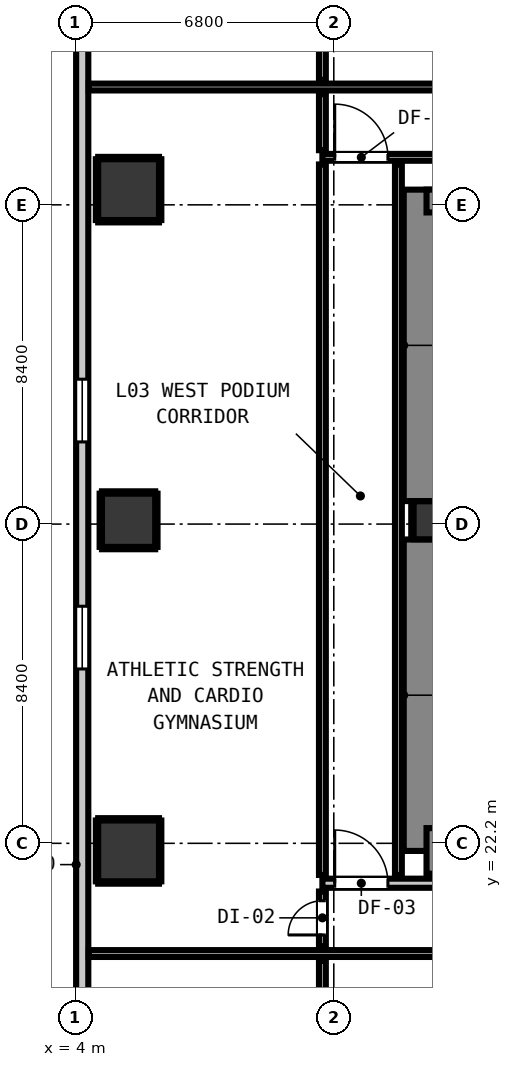
"""IFC4 building model, lengths in metres.
Left out: names, types, materials, properties, quantities, classifications, styles, units other than length and angle.
Written with IfcOpenShell. Run it as: python <this file> out.ifc"""

import sys

from ifc_helpers import new_model, si_unit, direction, frame, frame_2d, origin, origin_2d, place, context, subcontext, project, spatial, rectangle, extrude, element, fill, save


model = new_model("IFC4")
c1 = context("Model", 3, precision=1e-05, world=origin(), true_north=direction((0.0, 1.0)))
c2 = subcontext(c1, "Body", "Model", "MODEL_VIEW")
j1 = project(units=[si_unit("LENGTHUNIT", "METRE"), si_unit("PLANEANGLEUNIT", "RADIAN")], contexts=[c1])
p1 = place(None, origin())
s1 = spatial("IfcSite", under=j1, at=p1, CompositionType="ELEMENT")
p2 = place(p1, origin())
s2 = spatial("IfcBuilding", under=s1, at=p2, CompositionType="ELEMENT")
p3 = place(p2, frame((0.0, 0.0, 13.6)))
s3 = spatial("IfcBuildingStorey", under=s2, at=p3, CompositionType="ELEMENT", Elevation=13.6)
p4 = place(p3, frame((13.4, 30.7, 0.0), z_axis=(0.0, 0.0, 1.0), x_axis=(1.0, 0.0, 0.0)))
e1 = element("IfcColumn", 1, at=p4, inside=s3, PredefinedType="COLUMN", context=c2, shape_type="SweptSolid", body=[
    extrude(rectangle(XDim=1.0, YDim=1.0, at=origin_2d()), origin(), (0.0, 0.0, 1.0), 4.2),
])
p5 = place(p3, frame((13.24, 22.0, 0.0), z_axis=(0.0, 0.0, 1.0), x_axis=(0.0, 1.0, 0.0)))
e2 = element("IfcWall", 2, at=p5, inside=s3, PredefinedType="SHEAR", context=c2, shape_type="SweptSolid", body=[
    extrude(rectangle(XDim=8.195, YDim=1.2, at=frame_2d((4.098, 0.0))), origin(), (0.0, 0.0, 1.0), 4.2),
])
p6 = place(p3, frame((13.24, 31.205, 0.0), z_axis=(0.0, 0.0, 1.0), x_axis=(0.0, 1.0, 0.0)))
e3 = element("IfcWall", 3, at=p6, inside=s3, PredefinedType="SHEAR", context=c2, shape_type="SweptSolid", body=[
    extrude(rectangle(XDim=8.195, YDim=1.2, at=frame_2d((4.097, 0.0))), origin(), (0.0, 0.0, 1.0), 4.2),
])
p7 = place(p3, frame((13.24, 22.0, 0.0), z_axis=(0.0, 0.0, 1.0), x_axis=(1.0, 0.0, 0.0)))
e4 = element("IfcWall", 4, at=p7, inside=s3, PredefinedType="SHEAR", context=c2, shape_type="SweptSolid", body=[
    extrude(rectangle(XDim=4.08, YDim=1.2, at=frame_2d((2.04, 0.0))), origin(), (0.0, 0.0, 1.0), 4.2),
])
p8 = place(p3, frame((13.24, 39.1, 0.0), z_axis=(0.0, 0.0, 1.0), x_axis=(1.0, 0.0, 0.0)))
e5 = element("IfcWall", 5, at=p8, inside=s3, PredefinedType="SHEAR", context=c2, shape_type="SweptSolid", body=[
    extrude(rectangle(XDim=4.08, YDim=0.6, at=frame_2d((2.04, 0.0))), origin(), (0.0, 0.0, 1.0), 4.2),
])
p9 = place(p3, frame((5.4, 22.0, 0.0), z_axis=(0.0, 0.0, 1.0), x_axis=(1.0, 0.0, 0.0)))
e6 = element("IfcColumn", 6, at=p9, inside=s3, PredefinedType="COLUMN", context=c2, shape_type="SweptSolid", body=[
    extrude(rectangle(XDim=1.6, YDim=1.6, at=origin_2d()), origin(), (0.0, 0.0, 1.0), 4.2),
])
p10 = place(p3, frame((5.4, 30.7, 0.0), z_axis=(0.0, 0.0, 1.0), x_axis=(1.0, 0.0, 0.0)))
e7 = element("IfcColumn", 7, at=p10, inside=s3, PredefinedType="COLUMN", context=c2, shape_type="SweptSolid", body=[
    extrude(rectangle(XDim=1.4, YDim=1.4, at=origin_2d()), origin(), (0.0, 0.0, 1.0), 4.2),
])
p11 = place(p3, frame((5.4, 39.4, 0.0), z_axis=(0.0, 0.0, 1.0), x_axis=(1.0, 0.0, 0.0)))
e8 = element("IfcColumn", 8, at=p11, inside=s3, PredefinedType="COLUMN", context=c2, shape_type="SweptSolid", body=[
    extrude(rectangle(XDim=1.6, YDim=1.6, at=origin_2d()), origin(), (0.0, 0.0, 1.0), 4.2),
])
p12 = place(p3, frame((4.18, 12.68, 0.0), z_axis=(0.0, 0.0, 1.0), x_axis=(0.0, 1.0, 0.0)))
e9 = element("IfcWall", 9, at=p12, inside=s3, PredefinedType="STANDARD", context=c2, shape_type="SweptSolid", body=[
    extrude(rectangle(XDim=35.84, YDim=0.32, at=frame_2d((17.92, 0.0))), origin(), (0.0, 0.0, 1.0), 3.78),
])
p13 = place(p12, frame((2.162, 0.0, 0.9)))
e10 = element("IfcOpeningElement", 10, at=p13, cuts=e9, PredefinedType="OPENING", context=c2, shape_type="SweptSolid", body=[
    extrude(rectangle(XDim=1.65, YDim=1.75, at=frame_2d((0.825, 0.875))), frame((0.0, 0.17, 0.0), z_axis=(0.0, -1.0, 0.0), x_axis=(1.0, 0.0, 0.0)), (0.0, 0.0, 1.0), 0.34),
])
p14 = place(p12, frame((14.108, 0.0, 0.9)))
e11 = element("IfcOpeningElement", 11, at=p14, cuts=e9, PredefinedType="OPENING", context=c2, shape_type="SweptSolid", body=[
    extrude(rectangle(XDim=1.65, YDim=1.75, at=frame_2d((0.825, 0.875))), frame((0.0, 0.17, 0.0), z_axis=(0.0, -1.0, 0.0), x_axis=(1.0, 0.0, 0.0)), (0.0, 0.0, 1.0), 0.34),
])
p15 = place(p12, frame((20.082, 0.0, 0.9)))
e12 = element("IfcOpeningElement", 12, at=p15, cuts=e9, PredefinedType="OPENING", context=c2, shape_type="SweptSolid", body=[
    extrude(rectangle(XDim=1.65, YDim=1.75, at=frame_2d((0.825, 0.875))), frame((0.0, 0.17, 0.0), z_axis=(0.0, -1.0, 0.0), x_axis=(1.0, 0.0, 0.0)), (0.0, 0.0, 1.0), 0.34),
])
p16 = place(p12, frame((32.028, 0.0, 0.9)))
e13 = element("IfcOpeningElement", 13, at=p16, cuts=e9, PredefinedType="OPENING", context=c2, shape_type="SweptSolid", body=[
    extrude(rectangle(XDim=1.65, YDim=1.75, at=frame_2d((0.825, 0.875))), frame((0.0, 0.17, 0.0), z_axis=(0.0, -1.0, 0.0), x_axis=(1.0, 0.0, 0.0)), (0.0, 0.0, 1.0), 0.34),
])
p17 = place(p3, frame((10.5, 21.15, 0.0), z_axis=(0.0, 0.0, 1.0), x_axis=(1.0, 0.0, 0.0)))
e14 = element("IfcWall", 14, at=p17, inside=s3, PredefinedType="PARTITIONING", context=c2, shape_type="SweptSolid", body=[
    extrude(rectangle(XDim=28.7, YDim=0.24, at=frame_2d((14.35, 0.0))), origin(), (0.0, 0.0, 1.0), 3.78),
])
p18 = place(p17, frame((7.71, 0.0, 0.0)))
e15 = element("IfcOpeningElement", 15, at=p18, cuts=e14, PredefinedType="OPENING", context=c2, shape_type="SweptSolid", body=[
    extrude(rectangle(XDim=1.1, YDim=2.15, at=frame_2d((0.55, 1.075))), frame((0.0, 0.13, 0.0), z_axis=(0.0, -1.0, 0.0), x_axis=(1.0, 0.0, 0.0)), (0.0, 0.0, 1.0), 0.26),
])
p19 = place(p17, frame((0.324, 0.0, 0.0)))
e16 = element("IfcOpeningElement", 16, at=p19, cuts=e14, PredefinedType="OPENING", context=c2, shape_type="SweptSolid", body=[
    extrude(rectangle(XDim=1.4, YDim=2.15, at=frame_2d((0.7, 1.075))), frame((0.0, 0.13, 0.0), z_axis=(0.0, -1.0, 0.0), x_axis=(1.0, 0.0, 0.0)), (0.0, 0.0, 1.0), 0.26),
])
p20 = place(p17, frame((27.026, 0.0, 0.0)))
e17 = element("IfcOpeningElement", 17, at=p20, cuts=e14, PredefinedType="OPENING", context=c2, shape_type="SweptSolid", body=[
    extrude(rectangle(XDim=1.4, YDim=2.15, at=frame_2d((0.7, 1.075))), frame((0.0, 0.13, 0.0), z_axis=(0.0, -1.0, 0.0), x_axis=(1.0, 0.0, 0.0)), (0.0, 0.0, 1.0), 0.26),
])
p21 = place(p3, frame((4.352, 19.3, 0.0), z_axis=(0.0, 0.0, 1.0), x_axis=(1.0, 0.0, 0.0)))
e18 = element("IfcWall", 18, at=p21, inside=s3, PredefinedType="PARTITIONING", context=c2, shape_type="SweptSolid", body=[
    extrude(rectangle(XDim=43.296, YDim=0.18, at=frame_2d((21.648, 0.0))), origin(), (0.0, 0.0, 1.0), 3.78),
])
p22 = place(p21, frame((12.872, 0.0, 0.0)))
e19 = element("IfcOpeningElement", 19, at=p22, cuts=e18, PredefinedType="OPENING", context=c2, shape_type="SweptSolid", body=[
    extrude(rectangle(XDim=0.9, YDim=2.1, at=frame_2d((0.45, 1.05))), frame((0.0, 0.1, 0.0), z_axis=(0.0, -1.0, 0.0), x_axis=(1.0, 0.0, 0.0)), (0.0, 0.0, 1.0), 0.2),
])
p23 = place(p21, frame((27.174, 0.0, 0.0)))
e20 = element("IfcOpeningElement", 20, at=p23, cuts=e18, PredefinedType="OPENING", context=c2, shape_type="SweptSolid", body=[
    extrude(rectangle(XDim=0.9, YDim=2.1, at=frame_2d((0.45, 1.05))), frame((0.0, 0.1, 0.0), z_axis=(0.0, -1.0, 0.0), x_axis=(1.0, 0.0, 0.0)), (0.0, 0.0, 1.0), 0.2),
])
p24 = place(p3, frame((10.5, 40.25, 0.0), z_axis=(0.0, 0.0, 1.0), x_axis=(1.0, 0.0, 0.0)))
e21 = element("IfcWall", 21, at=p24, inside=s3, PredefinedType="PARTITIONING", context=c2, shape_type="SweptSolid", body=[
    extrude(rectangle(XDim=37.2, YDim=0.18, at=frame_2d((18.6, 0.0))), origin(), (0.0, 0.0, 1.0), 3.78),
])
p25 = place(p24, frame((6.935, 0.0, 0.0)))
e22 = element("IfcOpeningElement", 22, at=p25, cuts=e21, PredefinedType="OPENING", context=c2, shape_type="SweptSolid", body=[
    extrude(rectangle(XDim=1.4, YDim=2.15, at=frame_2d((0.7, 1.075))), frame((0.0, 0.1, 0.0), z_axis=(0.0, -1.0, 0.0), x_axis=(1.0, 0.0, 0.0)), (0.0, 0.0, 1.0), 0.2),
])
p26 = place(p24, frame((0.324, 0.0, 0.0)))
e23 = element("IfcOpeningElement", 23, at=p26, cuts=e21, PredefinedType="OPENING", context=c2, shape_type="SweptSolid", body=[
    extrude(rectangle(XDim=1.4, YDim=2.15, at=frame_2d((0.7, 1.075))), frame((0.0, 0.1, 0.0), z_axis=(0.0, -1.0, 0.0), x_axis=(1.0, 0.0, 0.0)), (0.0, 0.0, 1.0), 0.2),
])
p27 = place(p24, frame((27.05, 0.0, 0.0)))
e24 = element("IfcOpeningElement", 24, at=p27, cuts=e21, PredefinedType="OPENING", context=c2, shape_type="SweptSolid", body=[
    extrude(rectangle(XDim=1.4, YDim=2.15, at=frame_2d((0.7, 1.075))), frame((0.0, 0.1, 0.0), z_axis=(0.0, -1.0, 0.0), x_axis=(1.0, 0.0, 0.0)), (0.0, 0.0, 1.0), 0.2),
])
p28 = place(p3, frame((4.352, 42.1, 0.0), z_axis=(0.0, 0.0, 1.0), x_axis=(1.0, 0.0, 0.0)))
e25 = element("IfcWall", 25, at=p28, inside=s3, PredefinedType="PARTITIONING", context=c2, shape_type="SweptSolid", body=[
    extrude(rectangle(XDim=43.296, YDim=0.18, at=frame_2d((21.648, 0.0))), origin(), (0.0, 0.0, 1.0), 3.78),
])
p29 = place(p28, frame((14.472, 0.0, 0.0)))
e26 = element("IfcOpeningElement", 26, at=p29, cuts=e25, PredefinedType="OPENING", context=c2, shape_type="SweptSolid", body=[
    extrude(rectangle(XDim=0.9, YDim=2.1, at=frame_2d((0.45, 1.05))), frame((0.0, 0.1, 0.0), z_axis=(0.0, -1.0, 0.0), x_axis=(1.0, 0.0, 0.0)), (0.0, 0.0, 1.0), 0.2),
])
p30 = place(p28, frame((25.118, 0.0, 0.0)))
e27 = element("IfcOpeningElement", 27, at=p30, cuts=e25, PredefinedType="OPENING", context=c2, shape_type="SweptSolid", body=[
    extrude(rectangle(XDim=0.86, YDim=2.02, at=frame_2d((0.43, 1.01))), frame((0.0, 0.1, 0.0), z_axis=(0.0, -1.0, 0.0), x_axis=(1.0, 0.0, 0.0)), (0.0, 0.0, 1.0), 0.2),
])
p31 = place(p28, frame((29.218, 0.0, 0.0)))
e28 = element("IfcOpeningElement", 28, at=p31, cuts=e25, PredefinedType="OPENING", context=c2, shape_type="SweptSolid", body=[
    extrude(rectangle(XDim=0.86, YDim=2.02, at=frame_2d((0.43, 1.01))), frame((0.0, 0.1, 0.0), z_axis=(0.0, -1.0, 0.0), x_axis=(1.0, 0.0, 0.0)), (0.0, 0.0, 1.0), 0.2),
])
p32 = place(p28, frame((32.873, 0.0, 0.0)))
e29 = element("IfcOpeningElement", 29, at=p32, cuts=e25, PredefinedType="OPENING", context=c2, shape_type="SweptSolid", body=[
    extrude(rectangle(XDim=0.95, YDim=2.1, at=frame_2d((0.475, 1.05))), frame((0.0, 0.1, 0.0), z_axis=(0.0, -1.0, 0.0), x_axis=(1.0, 0.0, 0.0)), (0.0, 0.0, 1.0), 0.2),
])
p33 = place(p28, frame((35.688, 0.0, 0.0)))
e30 = element("IfcOpeningElement", 30, at=p33, cuts=e25, PredefinedType="OPENING", context=c2, shape_type="SweptSolid", body=[
    extrude(rectangle(XDim=0.9, YDim=2.1, at=frame_2d((0.45, 1.05))), frame((0.0, 0.1, 0.0), z_axis=(0.0, -1.0, 0.0), x_axis=(1.0, 0.0, 0.0)), (0.0, 0.0, 1.0), 0.2),
])
p34 = place(p3, frame((10.5, 12.358, 0.0), z_axis=(0.0, 0.0, 1.0), x_axis=(0.0, 1.0, 0.0)))
e31 = element("IfcWall", 31, at=p34, inside=s3, PredefinedType="PARTITIONING", context=c2, shape_type="SweptSolid", body=[
    extrude(rectangle(XDim=6.754, YDim=0.18, at=frame_2d((3.377, 0.0))), origin(), (0.0, 0.0, 1.0), 3.78),
])
p35 = place(p3, frame((10.5, 19.488, 0.0), z_axis=(0.0, 0.0, 1.0), x_axis=(0.0, 1.0, 0.0)))
e32 = element("IfcWall", 32, at=p35, inside=s3, PredefinedType="PARTITIONING", context=c2, shape_type="SweptSolid", body=[
    extrude(rectangle(XDim=1.444, YDim=0.18, at=frame_2d((0.722, 0.0))), origin(), (0.0, 0.0, 1.0), 3.78),
])
p36 = place(p35, frame((0.301, 0.0, 0.0)))
e33 = element("IfcOpeningElement", 33, at=p36, cuts=e32, PredefinedType="OPENING", context=c2, shape_type="SweptSolid", body=[
    extrude(rectangle(XDim=0.9, YDim=2.1, at=frame_2d((0.45, 1.05))), frame((0.0, 0.1, 0.0), z_axis=(0.0, -1.0, 0.0), x_axis=(1.0, 0.0, 0.0)), (0.0, 0.0, 1.0), 0.2),
])
p37 = place(p3, frame((10.5, 21.368, 0.0), z_axis=(0.0, 0.0, 1.0), x_axis=(0.0, 1.0, 0.0)))
e34 = element("IfcWall", 34, at=p37, inside=s3, PredefinedType="PARTITIONING", context=c2, shape_type="SweptSolid", body=[
    extrude(rectangle(XDim=18.694, YDim=0.18, at=frame_2d((9.347, 0.0))), origin(), (0.0, 0.0, 1.0), 3.78),
])
p38 = place(p3, frame((10.5, 40.438, 0.0), z_axis=(0.0, 0.0, 1.0), x_axis=(0.0, 1.0, 0.0)))
e35 = element("IfcWall", 35, at=p38, inside=s3, PredefinedType="PARTITIONING", context=c2, shape_type="SweptSolid", body=[
    extrude(rectangle(XDim=1.474, YDim=0.18, at=frame_2d((0.737, 0.0))), origin(), (0.0, 0.0, 1.0), 3.78),
])
p39 = place(p3, frame((10.5, 42.288, 0.0), z_axis=(0.0, 0.0, 1.0), x_axis=(0.0, 1.0, 0.0)))
e36 = element("IfcWall", 36, at=p39, inside=s3, PredefinedType="PARTITIONING", context=c2, shape_type="SweptSolid", body=[
    extrude(rectangle(XDim=8.56, YDim=0.18, at=frame_2d((4.28, 0.0))), origin(), (0.0, 0.0, 1.0), 3.78),
])
p40 = place(p3, frame((12.5, 21.368, 0.0), z_axis=(0.0, 0.0, 1.0), x_axis=(0.0, 1.0, 0.0)))
e37 = element("IfcWall", 37, at=p40, inside=s3, PredefinedType="PARTITIONING", context=c2, shape_type="SweptSolid", body=[
    extrude(rectangle(XDim=18.694, YDim=0.18, at=frame_2d((9.347, 0.0))), origin(), (0.0, 0.0, 1.0), 3.78),
])
p41 = place(p3, frame((12.868, 30.21, 0.0), z_axis=(0.0, 0.0, 1.0), x_axis=(0.0, 1.0, 0.0)))
e38 = element("IfcWall", 38, at=p41, inside=s3, PredefinedType="PARTITIONING", context=c2, shape_type="SweptSolid", body=[
    extrude(rectangle(XDim=0.98, YDim=0.06, at=frame_2d((0.49, 0.0))), origin(), (0.0, 0.0, 1.0), 1.45),
])
for number, where, z_axis, x_axis in (
    (39, (4.6, 21.168, 0.0), (0.0, 0.0, 1.0), (1.0, 0.0, 0.0)),
    (40, (4.6, 22.832, 0.0), (0.0, 0.0, 1.0), (1.0, 0.0, 0.0)),
):
    element("IfcWall", number, at=place(p3, frame(where, z_axis=z_axis, x_axis=x_axis)), inside=s3, PredefinedType="PARTITIONING", context=c2, shape_type="SweptSolid", body=[
        extrude(rectangle(XDim=1.6, YDim=0.06, at=frame_2d((0.8, 0.0))), origin(), (0.0, 0.0, 1.0), 1.45),
    ])
for number, where, z_axis, x_axis in (
    (41, (4.568, 21.2, 0.0), (0.0, 0.0, 1.0), (0.0, 1.0, 0.0)),
    (42, (6.232, 21.2, 0.0), (0.0, 0.0, 1.0), (0.0, 1.0, 0.0)),
):
    element("IfcWall", number, at=place(p3, frame(where, z_axis=z_axis, x_axis=x_axis)), inside=s3, PredefinedType="PARTITIONING", context=c2, shape_type="SweptSolid", body=[
        extrude(rectangle(XDim=1.6, YDim=0.06, at=frame_2d((0.8, 0.0))), origin(), (0.0, 0.0, 1.0), 1.45),
    ])
for number, where, z_axis, x_axis in (
    (43, (4.7, 29.968, 0.0), (0.0, 0.0, 1.0), (1.0, 0.0, 0.0)),
    (44, (4.7, 31.432, 0.0), (0.0, 0.0, 1.0), (1.0, 0.0, 0.0)),
):
    element("IfcWall", number, at=place(p3, frame(where, z_axis=z_axis, x_axis=x_axis)), inside=s3, PredefinedType="PARTITIONING", context=c2, shape_type="SweptSolid", body=[
        extrude(rectangle(XDim=1.4, YDim=0.06, at=frame_2d((0.7, 0.0))), origin(), (0.0, 0.0, 1.0), 1.45),
    ])
for number, where, z_axis, x_axis in (
    (45, (4.668, 30.0, 0.0), (0.0, 0.0, 1.0), (0.0, 1.0, 0.0)),
    (46, (6.132, 30.0, 0.0), (0.0, 0.0, 1.0), (0.0, 1.0, 0.0)),
):
    element("IfcWall", number, at=place(p3, frame(where, z_axis=z_axis, x_axis=x_axis)), inside=s3, PredefinedType="PARTITIONING", context=c2, shape_type="SweptSolid", body=[
        extrude(rectangle(XDim=1.4, YDim=0.06, at=frame_2d((0.7, 0.0))), origin(), (0.0, 0.0, 1.0), 1.45),
    ])
for number, where, z_axis, x_axis in (
    (47, (4.6, 38.568, 0.0), (0.0, 0.0, 1.0), (1.0, 0.0, 0.0)),
    (48, (4.6, 40.232, 0.0), (0.0, 0.0, 1.0), (1.0, 0.0, 0.0)),
    (49, (4.568, 38.6, 0.0), (0.0, 0.0, 1.0), (0.0, 1.0, 0.0)),
    (50, (6.232, 38.6, 0.0), (0.0, 0.0, 1.0), (0.0, 1.0, 0.0)),
):
    element("IfcWall", number, at=place(p3, frame(where, z_axis=z_axis, x_axis=x_axis)), inside=s3, PredefinedType="PARTITIONING", context=c2, shape_type="SweptSolid", body=[
        extrude(rectangle(XDim=1.6, YDim=0.06, at=frame_2d((0.8, 0.0))), origin(), (0.0, 0.0, 1.0), 1.45),
    ])
p42 = place(p14, origin())
e51 = element("IfcWindow", 51, at=p42, inside=s3, PartitioningType="SINGLE_PANEL", PredefinedType="WINDOW", context=c2, shape_type="SweptSolid", body=[
    extrude(rectangle(XDim=1.65, YDim=1.75, at=frame_2d((0.825, 0.875))), frame((0.0, 0.03, 0.0), z_axis=(0.0, -1.0, 0.0), x_axis=(1.0, 0.0, 0.0)), (0.0, 0.0, 1.0), 0.06),
])
fill(e11, e51)
p43 = place(p15, origin())
e52 = element("IfcWindow", 52, at=p43, inside=s3, PartitioningType="SINGLE_PANEL", PredefinedType="WINDOW", context=c2, shape_type="SweptSolid", body=[
    extrude(rectangle(XDim=1.65, YDim=1.75, at=frame_2d((0.825, 0.875))), frame((0.0, 0.03, 0.0), z_axis=(0.0, -1.0, 0.0), x_axis=(1.0, 0.0, 0.0)), (0.0, 0.0, 1.0), 0.06),
])
fill(e12, e52)
p44 = place(p19, origin())
e53 = element("IfcDoor", 53, at=p44, inside=s3, OperationType="SINGLE_SWING_LEFT", PredefinedType="DOOR", context=c2, shape_type="SweptSolid", body=[
    extrude(rectangle(XDim=1.4, YDim=2.15, at=frame_2d((0.7, 1.075))), frame((0.0, 0.025, 0.0), z_axis=(0.0, -1.0, 0.0), x_axis=(1.0, 0.0, 0.0)), (0.0, 0.0, 1.0), 0.05),
])
fill(e16, e53)
p45 = place(p26, origin())
e54 = element("IfcDoor", 54, at=p45, inside=s3, OperationType="SINGLE_SWING_LEFT", PredefinedType="DOOR", context=c2, shape_type="SweptSolid", body=[
    extrude(rectangle(XDim=1.4, YDim=2.15, at=frame_2d((0.7, 1.075))), frame((0.0, 0.025, 0.0), z_axis=(0.0, -1.0, 0.0), x_axis=(1.0, 0.0, 0.0)), (0.0, 0.0, 1.0), 0.05),
])
fill(e23, e54)
p46 = place(p36, origin())
e55 = element("IfcDoor", 55, at=p46, inside=s3, OperationType="SINGLE_SWING_LEFT", PredefinedType="DOOR", context=c2, shape_type="SweptSolid", body=[
    extrude(rectangle(XDim=0.9, YDim=2.1, at=frame_2d((0.45, 1.05))), frame((0.0, 0.025, 0.0), z_axis=(0.0, -1.0, 0.0), x_axis=(1.0, 0.0, 0.0)), (0.0, 0.0, 1.0), 0.05),
])
fill(e33, e55)
save(model, sys.argv[1])
